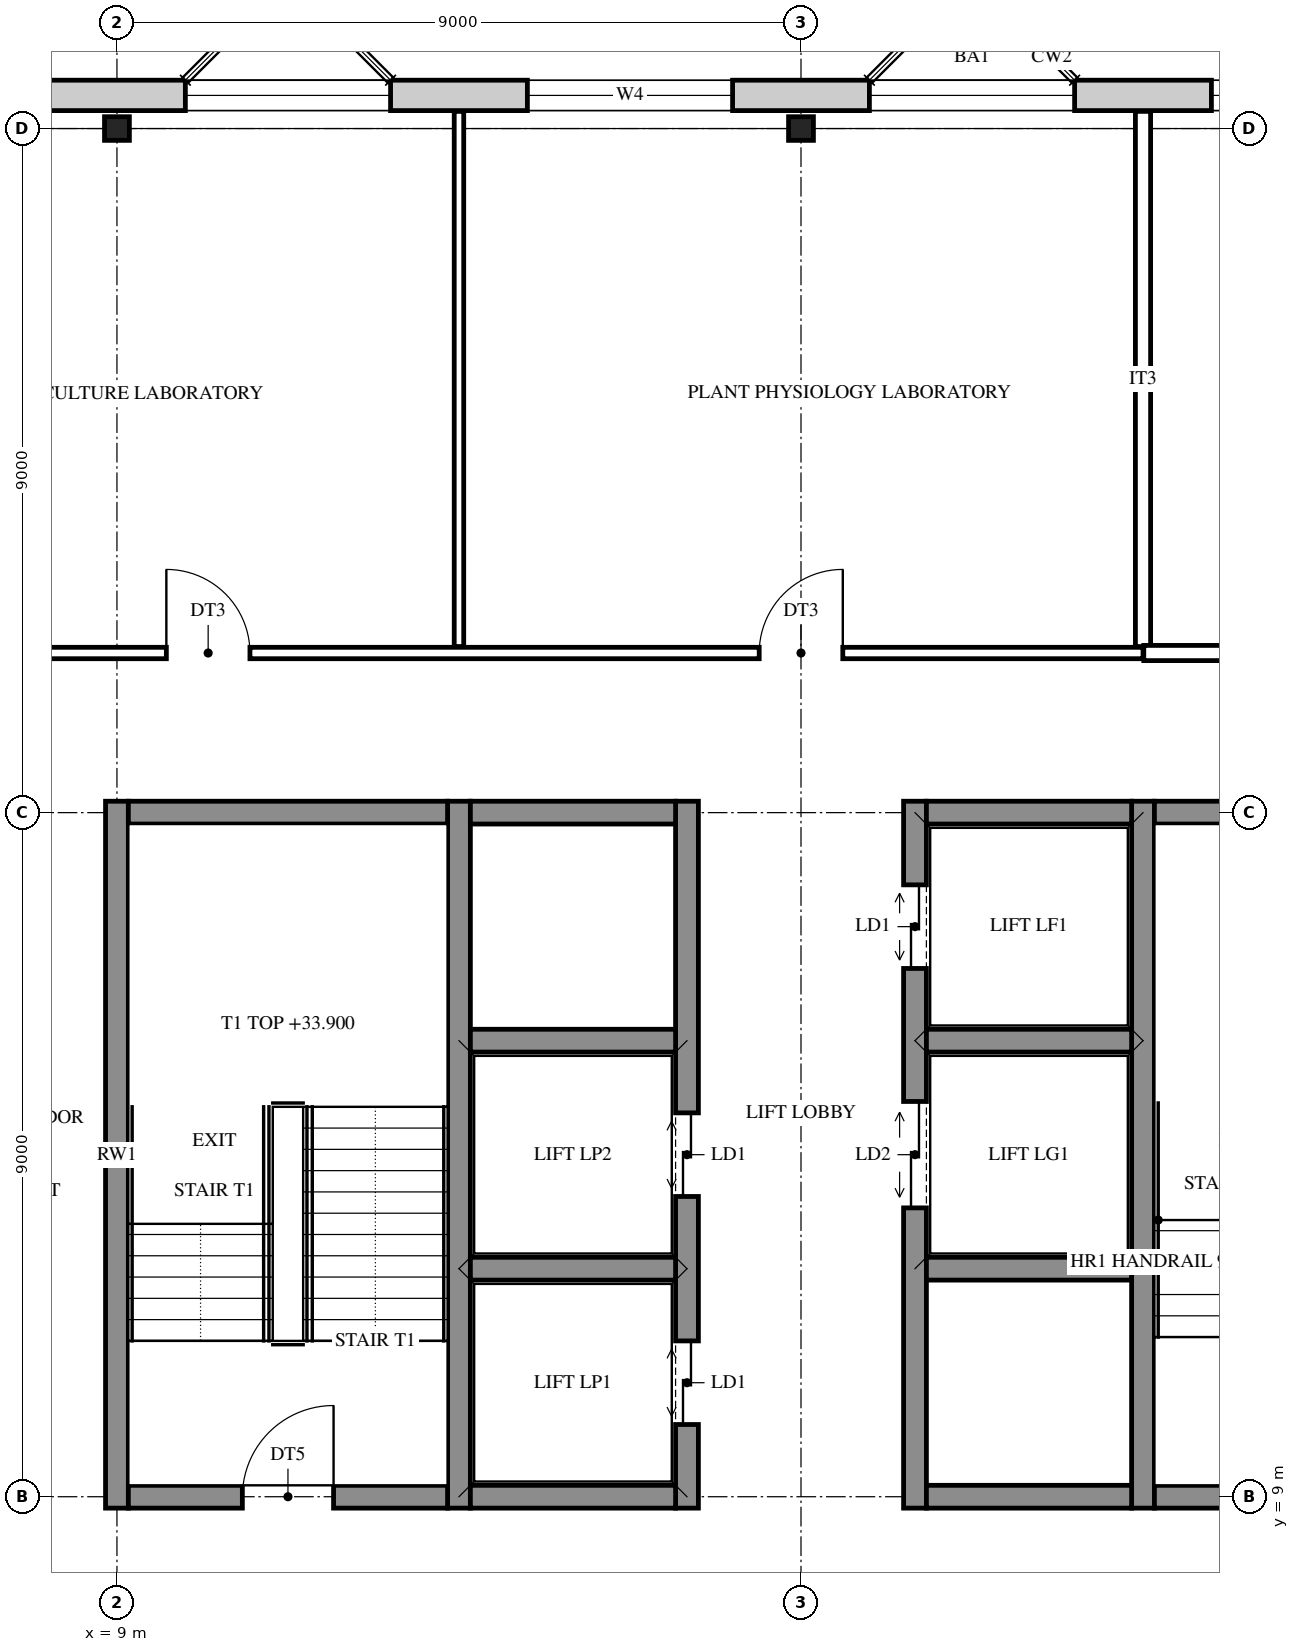
"""IFC4 building model, lengths in metres.
Left out: names, types, materials, properties, quantities, classifications, styles, units other than length and angle.
Written with IfcOpenShell. Run it as: python <this file> out.ifc"""

import sys

from ifc_helpers import new_model, si_unit, direction, frame, frame_2d, origin, origin_2d, place, context, subcontext, project, spatial, rectangle, i_section, extrude, element, fill, save


model = new_model("IFC4")
c1 = context("Model", 3, precision=1e-05, world=origin(), true_north=direction((0.0, 1.0)))
c2 = subcontext(c1, "Body", "Model", "MODEL_VIEW")
j1 = project(units=[si_unit("LENGTHUNIT", "METRE"), si_unit("PLANEANGLEUNIT", "RADIAN")], contexts=[c1])
p1 = place(None, origin())
s1 = spatial("IfcSite", under=j1, at=p1, CompositionType="ELEMENT")
p2 = place(p1, origin())
s2 = spatial("IfcBuilding", under=s1, at=p2, CompositionType="ELEMENT")
p3 = place(p2, frame((0.0, 0.0, 31.8)))
s3 = spatial("IfcBuildingStorey", under=s2, at=p3, CompositionType="ELEMENT", Elevation=31.8)
for number, where, z_axis, x_axis in (
    (1, (9.0, 27.0, 0.0), (0.0, 0.0, 1.0), (0.0, 1.0, 0.0)),
    (2, (18.0, 27.0, 0.0), (0.0, 0.0, 1.0), (0.0, 1.0, 0.0)),
):
    element("IfcColumn", number, at=place(p3, frame(where, z_axis=z_axis, x_axis=x_axis)), inside=s3, PredefinedType="COLUMN", context=c2, shape_type="SweptSolid", body=[
        extrude(i_section(OverallWidth=0.311, OverallDepth=0.327, WebThickness=0.016, FlangeThickness=0.025, FilletRadius=0.017, at=origin_2d()), origin(), (0.0, 0.0, 1.0), 4.2),
    ])
for number, where, z_axis, x_axis in (
    (3, (9.0, 8.85, 0.0), (0.0, 0.0, 1.0), (0.0, 1.0, 0.0)),
    (4, (13.5, 8.85, 0.0), (0.0, 0.0, 1.0), (0.0, 1.0, 0.0)),
):
    element("IfcWall", number, at=place(p3, frame(where, z_axis=z_axis, x_axis=x_axis)), inside=s3, PredefinedType="SHEAR", context=c2, shape_type="SweptSolid", body=[
        extrude(rectangle(XDim=9.3, YDim=0.3, at=frame_2d((4.65, 0.0))), origin(), (0.0, 0.0, 1.0), 4.2),
    ])
p4 = place(p3, frame((16.5, 8.85, 0.0), z_axis=(0.0, 0.0, 1.0), x_axis=(0.0, 1.0, 0.0)))
e5 = element("IfcWall", 5, at=p4, inside=s3, PredefinedType="SHEAR", context=c2, shape_type="SweptSolid", body=[
    extrude(rectangle(XDim=9.3, YDim=0.3, at=frame_2d((4.65, 0.0))), origin(), (0.0, 0.0, 1.0), 4.2),
])
p5 = place(p4, frame((1.1, 0.0, 0.0)))
e6 = element("IfcOpeningElement", 6, at=p5, cuts=e5, PredefinedType="OPENING", context=c2, shape_type="SweptSolid", body=[
    extrude(rectangle(XDim=1.1, YDim=2.1, at=frame_2d((0.55, 1.05))), frame((0.0, 0.16, 0.0), z_axis=(0.0, -1.0, 0.0), x_axis=(1.0, 0.0, 0.0)), (0.0, 0.0, 1.0), 0.32),
])
p6 = place(p4, frame((4.1, 0.0, 0.0)))
e7 = element("IfcOpeningElement", 7, at=p6, cuts=e5, PredefinedType="OPENING", context=c2, shape_type="SweptSolid", body=[
    extrude(rectangle(XDim=1.1, YDim=2.1, at=frame_2d((0.55, 1.05))), frame((0.0, 0.16, 0.0), z_axis=(0.0, -1.0, 0.0), x_axis=(1.0, 0.0, 0.0)), (0.0, 0.0, 1.0), 0.32),
])
p7 = place(p3, frame((19.5, 8.85, 0.0), z_axis=(0.0, 0.0, 1.0), x_axis=(0.0, 1.0, 0.0)))
e8 = element("IfcWall", 8, at=p7, inside=s3, PredefinedType="SHEAR", context=c2, shape_type="SweptSolid", body=[
    extrude(rectangle(XDim=9.3, YDim=0.3, at=frame_2d((4.65, 0.0))), origin(), (0.0, 0.0, 1.0), 4.2),
])
p8 = place(p7, frame((3.95, 0.0, 0.0)))
e9 = element("IfcOpeningElement", 9, at=p8, cuts=e8, PredefinedType="OPENING", context=c2, shape_type="SweptSolid", body=[
    extrude(rectangle(XDim=1.4, YDim=2.1, at=frame_2d((0.7, 1.05))), frame((0.0, 0.16, 0.0), z_axis=(0.0, -1.0, 0.0), x_axis=(1.0, 0.0, 0.0)), (0.0, 0.0, 1.0), 0.32),
])
p9 = place(p7, frame((7.1, 0.0, 0.0)))
e10 = element("IfcOpeningElement", 10, at=p9, cuts=e8, PredefinedType="OPENING", context=c2, shape_type="SweptSolid", body=[
    extrude(rectangle(XDim=1.1, YDim=2.1, at=frame_2d((0.55, 1.05))), frame((0.0, 0.16, 0.0), z_axis=(0.0, -1.0, 0.0), x_axis=(1.0, 0.0, 0.0)), (0.0, 0.0, 1.0), 0.32),
])
p10 = place(p3, frame((22.5, 8.85, 0.0), z_axis=(0.0, 0.0, 1.0), x_axis=(0.0, 1.0, 0.0)))
e11 = element("IfcWall", 11, at=p10, inside=s3, PredefinedType="SHEAR", context=c2, shape_type="SweptSolid", body=[
    extrude(rectangle(XDim=9.3, YDim=0.3, at=frame_2d((4.65, 0.0))), origin(), (0.0, 0.0, 1.0), 4.2),
])
p11 = place(p3, frame((9.15, 9.0, 0.0), z_axis=(0.0, 0.0, 1.0), x_axis=(1.0, 0.0, 0.0)))
e12 = element("IfcWall", 12, at=p11, inside=s3, PredefinedType="SHEAR", context=c2, shape_type="SweptSolid", body=[
    extrude(rectangle(XDim=4.2, YDim=0.3, at=frame_2d((2.1, 0.0))), origin(), (0.0, 0.0, 1.0), 4.2),
])
p12 = place(p11, frame((1.5, 0.0, 0.0)))
e13 = element("IfcOpeningElement", 13, at=p12, cuts=e12, PredefinedType="OPENING", context=c2, shape_type="SweptSolid", body=[
    extrude(rectangle(XDim=1.2, YDim=2.1, at=frame_2d((0.6, 1.05))), frame((0.0, 0.16, 0.0), z_axis=(0.0, -1.0, 0.0), x_axis=(1.0, 0.0, 0.0)), (0.0, 0.0, 1.0), 0.32),
])
for number, where, z_axis, x_axis in (
    (14, (13.65, 9.0, 0.0), (0.0, 0.0, 1.0), (1.0, 0.0, 0.0)),
    (15, (19.65, 9.0, 0.0), (0.0, 0.0, 1.0), (1.0, 0.0, 0.0)),
):
    element("IfcWall", number, at=place(p3, frame(where, z_axis=z_axis, x_axis=x_axis)), inside=s3, PredefinedType="SHEAR", context=c2, shape_type="SweptSolid", body=[
        extrude(rectangle(XDim=2.7, YDim=0.3, at=frame_2d((1.35, 0.0))), origin(), (0.0, 0.0, 1.0), 4.2),
    ])
p13 = place(p3, frame((22.65, 9.0, 0.0), z_axis=(0.0, 0.0, 1.0), x_axis=(1.0, 0.0, 0.0)))
e16 = element("IfcWall", 16, at=p13, inside=s3, PredefinedType="SHEAR", context=c2, shape_type="SweptSolid", body=[
    extrude(rectangle(XDim=4.2, YDim=0.3, at=frame_2d((2.1, 0.0))), origin(), (0.0, 0.0, 1.0), 4.2),
])
p14 = place(p13, frame((1.5, 0.0, 0.0)))
e17 = element("IfcOpeningElement", 17, at=p14, cuts=e16, PredefinedType="OPENING", context=c2, shape_type="SweptSolid", body=[
    extrude(rectangle(XDim=1.2, YDim=2.1, at=frame_2d((0.6, 1.05))), frame((0.0, 0.16, 0.0), z_axis=(0.0, -1.0, 0.0), x_axis=(1.0, 0.0, 0.0)), (0.0, 0.0, 1.0), 0.32),
])
for number, where, z_axis, x_axis in (
    (18, (13.65, 12.0, 0.0), (0.0, 0.0, 1.0), (1.0, 0.0, 0.0)),
    (19, (19.65, 12.0, 0.0), (0.0, 0.0, 1.0), (1.0, 0.0, 0.0)),
    (20, (13.65, 15.0, 0.0), (0.0, 0.0, 1.0), (1.0, 0.0, 0.0)),
    (21, (19.65, 15.0, 0.0), (0.0, 0.0, 1.0), (1.0, 0.0, 0.0)),
):
    element("IfcWall", number, at=place(p3, frame(where, z_axis=z_axis, x_axis=x_axis)), inside=s3, PredefinedType="SHEAR", context=c2, shape_type="SweptSolid", body=[
        extrude(rectangle(XDim=2.7, YDim=0.3, at=frame_2d((1.35, 0.0))), origin(), (0.0, 0.0, 1.0), 4.2),
    ])
p15 = place(p3, frame((9.15, 18.0, 0.0), z_axis=(0.0, 0.0, 1.0), x_axis=(1.0, 0.0, 0.0)))
e22 = element("IfcWall", 22, at=p15, inside=s3, PredefinedType="SHEAR", context=c2, shape_type="SweptSolid", body=[
    extrude(rectangle(XDim=4.2, YDim=0.3, at=frame_2d((2.1, 0.0))), origin(), (0.0, 0.0, 1.0), 4.2),
])
for number, where, z_axis, x_axis in (
    (23, (13.65, 18.0, 0.0), (0.0, 0.0, 1.0), (1.0, 0.0, 0.0)),
    (24, (19.65, 18.0, 0.0), (0.0, 0.0, 1.0), (1.0, 0.0, 0.0)),
):
    element("IfcWall", number, at=place(p3, frame(where, z_axis=z_axis, x_axis=x_axis)), inside=s3, PredefinedType="SHEAR", context=c2, shape_type="SweptSolid", body=[
        extrude(rectangle(XDim=2.7, YDim=0.3, at=frame_2d((1.35, 0.0))), origin(), (0.0, 0.0, 1.0), 4.2),
    ])
p16 = place(p3, frame((22.65, 18.0, 0.0), z_axis=(0.0, 0.0, 1.0), x_axis=(1.0, 0.0, 0.0)))
e25 = element("IfcWall", 25, at=p16, inside=s3, PredefinedType="SHEAR", context=c2, shape_type="SweptSolid", body=[
    extrude(rectangle(XDim=4.2, YDim=0.3, at=frame_2d((2.1, 0.0))), origin(), (0.0, 0.0, 1.0), 4.2),
])
p17 = place(p3, frame((-0.625, 27.436, 0.0), z_axis=(0.0, 0.0, 1.0), x_axis=(1.0, 0.0, 0.0)))
e26 = element("IfcWall", 26, at=p17, inside=s3, PredefinedType="STANDARD", context=c2, shape_type="SweptSolid", body=[
    extrude(rectangle(XDim=32.75, YDim=0.4, at=frame_2d((16.375, 0.0))), origin(), (0.0, 0.0, 1.0), 4.2),
])
p18 = place(p17, frame((1.525, 0.0, 0.9)))
e27 = element("IfcOpeningElement", 27, at=p18, cuts=e26, PredefinedType="OPENING", context=c2, shape_type="SweptSolid", body=[
    extrude(rectangle(XDim=2.7, YDim=2.5, at=frame_2d((1.35, 1.25))), frame((0.0, 0.21, 0.0), z_axis=(0.0, -1.0, 0.0), x_axis=(1.0, 0.0, 0.0)), (0.0, 0.0, 1.0), 0.42),
])
p19 = place(p17, frame((6.025, 0.0, 0.9)))
e28 = element("IfcOpeningElement", 28, at=p19, cuts=e26, PredefinedType="OPENING", context=c2, shape_type="SweptSolid", body=[
    extrude(rectangle(XDim=2.7, YDim=2.5, at=frame_2d((1.35, 1.25))), frame((0.0, 0.21, 0.0), z_axis=(0.0, -1.0, 0.0), x_axis=(1.0, 0.0, 0.0)), (0.0, 0.0, 1.0), 0.42),
])
p20 = place(p17, frame((10.525, 0.0, 0.9)))
e29 = element("IfcOpeningElement", 29, at=p20, cuts=e26, PredefinedType="OPENING", context=c2, shape_type="SweptSolid", body=[
    extrude(rectangle(XDim=2.7, YDim=2.5, at=frame_2d((1.35, 1.25))), frame((0.0, 0.21, 0.0), z_axis=(0.0, -1.0, 0.0), x_axis=(1.0, 0.0, 0.0)), (0.0, 0.0, 1.0), 0.42),
])
p21 = place(p17, frame((15.025, 0.0, 0.9)))
e30 = element("IfcOpeningElement", 30, at=p21, cuts=e26, PredefinedType="OPENING", context=c2, shape_type="SweptSolid", body=[
    extrude(rectangle(XDim=2.7, YDim=2.5, at=frame_2d((1.35, 1.25))), frame((0.0, 0.21, 0.0), z_axis=(0.0, -1.0, 0.0), x_axis=(1.0, 0.0, 0.0)), (0.0, 0.0, 1.0), 0.42),
])
p22 = place(p17, frame((19.525, 0.0, 0.9)))
e31 = element("IfcOpeningElement", 31, at=p22, cuts=e26, PredefinedType="OPENING", context=c2, shape_type="SweptSolid", body=[
    extrude(rectangle(XDim=2.7, YDim=2.5, at=frame_2d((1.35, 1.25))), frame((0.0, 0.21, 0.0), z_axis=(0.0, -1.0, 0.0), x_axis=(1.0, 0.0, 0.0)), (0.0, 0.0, 1.0), 0.42),
])
p23 = place(p17, frame((24.025, 0.0, 0.9)))
e32 = element("IfcOpeningElement", 32, at=p23, cuts=e26, PredefinedType="OPENING", context=c2, shape_type="SweptSolid", body=[
    extrude(rectangle(XDim=2.7, YDim=2.5, at=frame_2d((1.35, 1.25))), frame((0.0, 0.21, 0.0), z_axis=(0.0, -1.0, 0.0), x_axis=(1.0, 0.0, 0.0)), (0.0, 0.0, 1.0), 0.42),
])
p24 = place(p17, frame((28.525, 0.0, 0.9)))
e33 = element("IfcOpeningElement", 33, at=p24, cuts=e26, PredefinedType="OPENING", context=c2, shape_type="SweptSolid", body=[
    extrude(rectangle(XDim=2.7, YDim=2.5, at=frame_2d((1.35, 1.25))), frame((0.0, 0.21, 0.0), z_axis=(0.0, -1.0, 0.0), x_axis=(1.0, 0.0, 0.0)), (0.0, 0.0, 1.0), 0.42),
])
p25 = place(p3, frame((13.5, 20.185, 0.0), z_axis=(0.0, 0.0, 1.0), x_axis=(0.0, 1.0, 0.0)))
e34 = element("IfcWall", 34, at=p25, inside=s3, PredefinedType="PARTITIONING", context=c2, shape_type="SweptSolid", body=[
    extrude(rectangle(XDim=7.041, YDim=0.125, at=frame_2d((3.521, 0.0))), origin(), (0.0, 0.0, 1.0), 3.537),
])
p26 = place(p3, frame((22.5, 20.185, 0.0), z_axis=(0.0, 0.0, 1.0), x_axis=(0.0, 1.0, 0.0)))
e35 = element("IfcWall", 35, at=p26, inside=s3, PredefinedType="PARTITIONING", context=c2, shape_type="SweptSolid", body=[
    extrude(rectangle(XDim=7.041, YDim=0.2, at=frame_2d((3.521, 0.0))), origin(), (0.0, 0.0, 1.0), 3.537),
])
p27 = place(p3, frame((6.9, 20.1, 0.0), z_axis=(0.0, 0.0, 1.0), x_axis=(1.0, 0.0, 0.0)))
e36 = element("IfcWall", 36, at=p27, inside=s3, PredefinedType="PARTITIONING", context=c2, shape_type="SweptSolid", body=[
    extrude(rectangle(XDim=15.6, YDim=0.15, at=frame_2d((7.8, 0.0))), origin(), (0.0, 0.0, 1.0), 3.537),
])
p28 = place(p27, frame((2.75, 0.0, 0.0)))
e37 = element("IfcOpeningElement", 37, at=p28, cuts=e36, PredefinedType="OPENING", context=c2, shape_type="SweptSolid", body=[
    extrude(rectangle(XDim=1.1, YDim=2.1, at=frame_2d((0.55, 1.05))), frame((0.0, 0.085, 0.0), z_axis=(0.0, -1.0, 0.0), x_axis=(1.0, 0.0, 0.0)), (0.0, 0.0, 1.0), 0.17),
])
p29 = place(p27, frame((10.55, 0.0, 0.0)))
e38 = element("IfcOpeningElement", 38, at=p29, cuts=e36, PredefinedType="OPENING", context=c2, shape_type="SweptSolid", body=[
    extrude(rectangle(XDim=1.1, YDim=2.1, at=frame_2d((0.55, 1.05))), frame((0.0, 0.085, 0.0), z_axis=(0.0, -1.0, 0.0), x_axis=(1.0, 0.0, 0.0)), (0.0, 0.0, 1.0), 0.17),
])
p30 = place(p3, frame((22.51, 20.1, 0.0), z_axis=(0.0, 0.0, 1.0), x_axis=(1.0, 0.0, 0.0)))
e39 = element("IfcWall", 39, at=p30, inside=s3, PredefinedType="PARTITIONING", context=c2, shape_type="SweptSolid", body=[
    extrude(rectangle(XDim=4.38, YDim=0.2, at=frame_2d((2.19, 0.0))), origin(), (0.0, 0.0, 1.0), 3.537),
])
p31 = place(p30, frame((2.94, 0.0, 0.0)))
e40 = element("IfcOpeningElement", 40, at=p31, cuts=e39, PredefinedType="OPENING", context=c2, shape_type="SweptSolid", body=[
    extrude(rectangle(XDim=1.0, YDim=2.1, at=frame_2d((0.5, 1.05))), frame((0.0, 0.11, 0.0), z_axis=(0.0, -1.0, 0.0), x_axis=(1.0, 0.0, 0.0)), (0.0, 0.0, 1.0), 0.22),
])
p32 = place(p20, origin())
e41 = element("IfcWindow", 41, at=p32, inside=s3, PartitioningType="SINGLE_PANEL", PredefinedType="WINDOW", context=c2, shape_type="SweptSolid", body=[
    extrude(rectangle(XDim=2.7, YDim=2.5, at=frame_2d((1.35, 1.25))), frame((0.0, 0.03, 0.0), z_axis=(0.0, -1.0, 0.0), x_axis=(1.0, 0.0, 0.0)), (0.0, 0.0, 1.0), 0.06),
])
fill(e29, e41)
p33 = place(p21, origin())
e42 = element("IfcWindow", 42, at=p33, inside=s3, PartitioningType="SINGLE_PANEL", PredefinedType="WINDOW", context=c2, shape_type="SweptSolid", body=[
    extrude(rectangle(XDim=2.7, YDim=2.5, at=frame_2d((1.35, 1.25))), frame((0.0, 0.03, 0.0), z_axis=(0.0, -1.0, 0.0), x_axis=(1.0, 0.0, 0.0)), (0.0, 0.0, 1.0), 0.06),
])
fill(e30, e42)
p34 = place(p22, origin())
e43 = element("IfcWindow", 43, at=p34, inside=s3, PartitioningType="SINGLE_PANEL", PredefinedType="WINDOW", context=c2, shape_type="SweptSolid", body=[
    extrude(rectangle(XDim=2.7, YDim=2.5, at=frame_2d((1.35, 1.25))), frame((0.0, 0.03, 0.0), z_axis=(0.0, -1.0, 0.0), x_axis=(1.0, 0.0, 0.0)), (0.0, 0.0, 1.0), 0.06),
])
fill(e31, e43)
p35 = place(p23, origin())
e44 = element("IfcWindow", 44, at=p35, inside=s3, PartitioningType="SINGLE_PANEL", PredefinedType="WINDOW", context=c2, shape_type="SweptSolid", body=[
    extrude(rectangle(XDim=2.7, YDim=2.5, at=frame_2d((1.35, 1.25))), frame((0.0, 0.03, 0.0), z_axis=(0.0, -1.0, 0.0), x_axis=(1.0, 0.0, 0.0)), (0.0, 0.0, 1.0), 0.06),
])
fill(e32, e44)
p36 = place(p12, origin())
e45 = element("IfcDoor", 45, at=p36, inside=s3, OperationType="SINGLE_SWING_RIGHT", PredefinedType="DOOR", context=c2, shape_type="SweptSolid", body=[
    extrude(rectangle(XDim=1.2, YDim=2.1, at=frame_2d((0.6, 1.05))), frame((0.0, 0.025, 0.0), z_axis=(0.0, -1.0, 0.0), x_axis=(1.0, 0.0, 0.0)), (0.0, 0.0, 1.0), 0.05),
])
fill(e13, e45)
p37 = place(p28, origin())
e46 = element("IfcDoor", 46, at=p37, inside=s3, OperationType="SINGLE_SWING_LEFT", PredefinedType="DOOR", context=c2, shape_type="SweptSolid", body=[
    extrude(rectangle(XDim=1.1, YDim=2.1, at=frame_2d((0.55, 1.05))), frame((0.0, 0.025, 0.0), z_axis=(0.0, -1.0, 0.0), x_axis=(1.0, 0.0, 0.0)), (0.0, 0.0, 1.0), 0.05),
])
fill(e37, e46)
p38 = place(p29, origin())
e47 = element("IfcDoor", 47, at=p38, inside=s3, OperationType="SINGLE_SWING_RIGHT", PredefinedType="DOOR", context=c2, shape_type="SweptSolid", body=[
    extrude(rectangle(XDim=1.1, YDim=2.1, at=frame_2d((0.55, 1.05))), frame((0.0, 0.025, 0.0), z_axis=(0.0, -1.0, 0.0), x_axis=(1.0, 0.0, 0.0)), (0.0, 0.0, 1.0), 0.05),
])
fill(e38, e47)
p39 = place(p5, origin())
e48 = element("IfcDoor", 48, at=p39, inside=s3, OperationType="DOUBLE_DOOR_SLIDING", PredefinedType="DOOR", context=c2, shape_type="SweptSolid", body=[
    extrude(rectangle(XDim=1.1, YDim=2.1, at=frame_2d((0.55, 1.05))), frame((0.0, 0.025, 0.0), z_axis=(0.0, -1.0, 0.0), x_axis=(1.0, 0.0, 0.0)), (0.0, 0.0, 1.0), 0.05),
])
fill(e6, e48)
p40 = place(p6, origin())
e49 = element("IfcDoor", 49, at=p40, inside=s3, OperationType="DOUBLE_DOOR_SLIDING", PredefinedType="DOOR", context=c2, shape_type="SweptSolid", body=[
    extrude(rectangle(XDim=1.1, YDim=2.1, at=frame_2d((0.55, 1.05))), frame((0.0, 0.025, 0.0), z_axis=(0.0, -1.0, 0.0), x_axis=(1.0, 0.0, 0.0)), (0.0, 0.0, 1.0), 0.05),
])
fill(e7, e49)
p41 = place(p8, origin())
e50 = element("IfcDoor", 50, at=p41, inside=s3, OperationType="DOUBLE_DOOR_SLIDING", PredefinedType="DOOR", context=c2, shape_type="SweptSolid", body=[
    extrude(rectangle(XDim=1.4, YDim=2.1, at=frame_2d((0.7, 1.05))), frame((0.0, 0.025, 0.0), z_axis=(0.0, -1.0, 0.0), x_axis=(1.0, 0.0, 0.0)), (0.0, 0.0, 1.0), 0.05),
])
fill(e9, e50)
p42 = place(p9, origin())
e51 = element("IfcDoor", 51, at=p42, inside=s3, OperationType="DOUBLE_DOOR_SLIDING", PredefinedType="DOOR", context=c2, shape_type="SweptSolid", body=[
    extrude(rectangle(XDim=1.1, YDim=2.1, at=frame_2d((0.55, 1.05))), frame((0.0, 0.025, 0.0), z_axis=(0.0, -1.0, 0.0), x_axis=(1.0, 0.0, 0.0)), (0.0, 0.0, 1.0), 0.05),
])
fill(e10, e51)
save(model, sys.argv[1])
